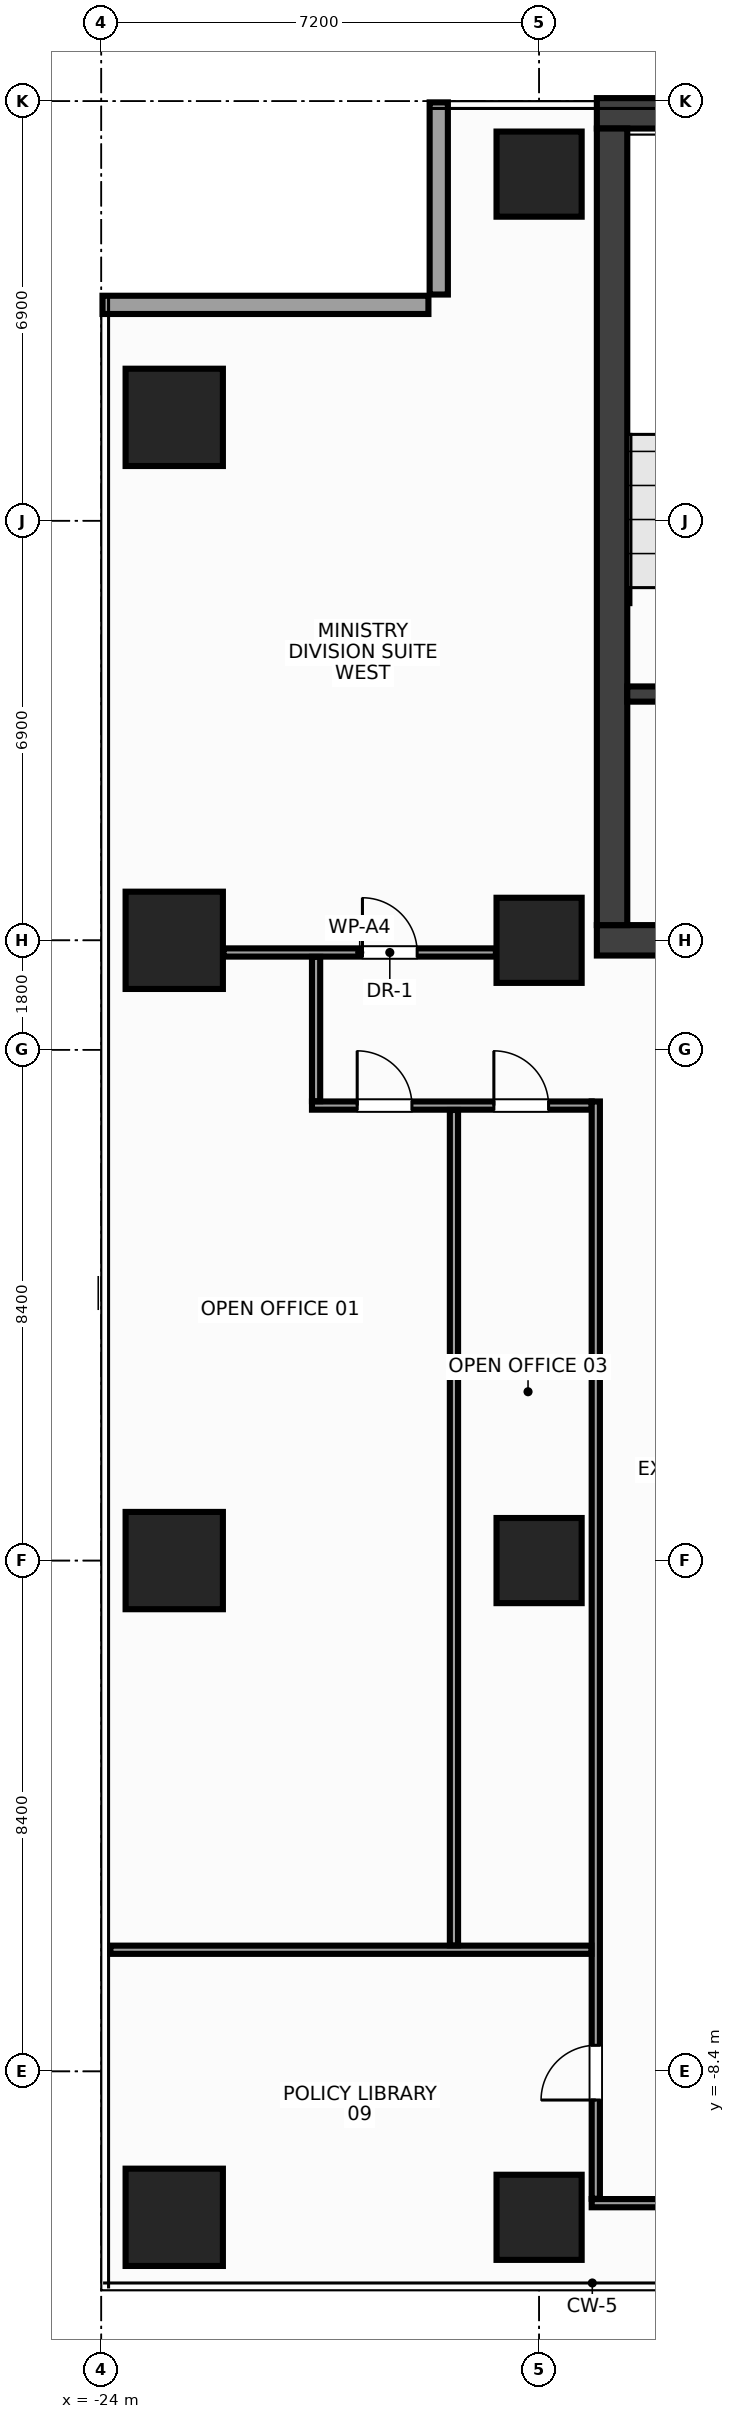
"""IFC4 building model, lengths in metres.
Left out: names, types, materials, properties, quantities, classifications, styles, units other than length and angle.
Written with IfcOpenShell. Run it as: python <this file> out.ifc"""

import sys

from ifc_helpers import new_model, si_unit, direction, frame, frame_2d, origin, origin_2d, place, context, subcontext, project, spatial, rectangle, extrude, source, transform, mapped, element, fill, save


model = new_model("IFC4")
c1 = context("Model", 3, precision=1e-05, world=origin(), true_north=direction((0.0, 1.0)))
c2 = subcontext(c1, "Body", "Model", "MODEL_VIEW")
j1 = project(units=[si_unit("LENGTHUNIT", "METRE"), si_unit("PLANEANGLEUNIT", "RADIAN")], contexts=[c1])
p1 = place(None, origin())
s1 = spatial("IfcSite", under=j1, at=p1, CompositionType="ELEMENT")
p2 = place(p1, origin())
s2 = spatial("IfcBuilding", under=s1, at=p2, CompositionType="ELEMENT")
p3 = place(p2, frame((0.0, 0.0, 196.4)))
s3 = spatial("IfcBuildingStorey", under=s2, at=p3, CompositionType="ELEMENT", Elevation=196.4)
m1 = source(origin(), c2, "Body", "SweptSolid", [
    extrude(rectangle(XDim=31.7, YDim=0.5, at=frame_2d((15.85, 0.0))), origin(), (0.0, 0.0, 1.0), 3.6),
])
p4 = place(p3, frame((-15.85, 23.8, 0.0), z_axis=(0.0, 0.0, 1.0), x_axis=(1.0, 0.0, 0.0)))
e1 = element("IfcWall", 1, at=p4, inside=s3, PredefinedType="SHEAR", context=c2, shape_type="MappedRepresentation", body=[
    mapped(m1, transform((0.0, 0.0, 0.0), x_axis=(1.0, 0.0, 0.0), y_axis=(0.0, 1.0, 0.0), z_axis=(0.0, 0.0, 1.0), scale=1.0)),
])
p5 = place(p3, frame((-15.85, 10.2, 0.0), z_axis=(0.0, 0.0, 1.0), x_axis=(1.0, 0.0, 0.0)))
e2 = element("IfcWall", 2, at=p5, inside=s3, PredefinedType="SHEAR", context=c2, shape_type="MappedRepresentation", body=[
    mapped(m1, transform((0.0, 0.0, 0.0), x_axis=(1.0, 0.0, 0.0), y_axis=(0.0, 1.0, 0.0), z_axis=(0.0, 0.0, 1.0), scale=1.0)),
])
p6 = place(p5, frame((1.7, 0.0, 0.0)))
e3 = element("IfcOpeningElement", 3, at=p6, cuts=e2, PredefinedType="OPENING", context=c2, shape_type="SweptSolid", body=[
    extrude(rectangle(XDim=1.6, YDim=2.15, at=frame_2d((0.8, 1.075))), frame((0.0, 0.262, 0.0), z_axis=(0.0, -1.0, 0.0), x_axis=(1.0, 0.0, 0.0)), (0.0, 0.0, 1.0), 0.524),
])
p7 = place(p5, frame((28.4, 0.0, 0.0)))
e4 = element("IfcOpeningElement", 4, at=p7, cuts=e2, PredefinedType="OPENING", context=c2, shape_type="SweptSolid", body=[
    extrude(rectangle(XDim=1.6, YDim=2.15, at=frame_2d((0.8, 1.075))), frame((0.0, 0.262, 0.0), z_axis=(0.0, -1.0, 0.0), x_axis=(1.0, 0.0, 0.0)), (0.0, 0.0, 1.0), 0.524),
])
p8 = place(p5, frame((15.1, 0.0, 0.0)))
e5 = element("IfcOpeningElement", 5, at=p8, cuts=e2, PredefinedType="OPENING", context=c2, shape_type="SweptSolid", body=[
    extrude(rectangle(XDim=1.5, YDim=2.2, at=frame_2d((0.75, 1.1))), frame((0.0, 0.262, 0.0), z_axis=(0.0, -1.0, 0.0), x_axis=(1.0, 0.0, 0.0)), (0.0, 0.0, 1.0), 0.524),
])
m2 = source(origin(), c2, "Body", "SweptSolid", [
    extrude(rectangle(XDim=13.1, YDim=0.5, at=frame_2d((6.55, 0.0))), origin(), (0.0, 0.0, 1.0), 3.6),
])
p9 = place(p3, frame((-15.6, 10.45, 0.0), z_axis=(0.0, 0.0, 1.0), x_axis=(0.0, 1.0, 0.0)))
e6 = element("IfcWall", 6, at=p9, inside=s3, PredefinedType="SHEAR", context=c2, shape_type="MappedRepresentation", body=[
    mapped(m2, transform((0.0, 0.0, 0.0), x_axis=(1.0, 0.0, 0.0), y_axis=(0.0, 1.0, 0.0), z_axis=(0.0, 0.0, 1.0), scale=1.0)),
])
m3 = source(origin(), c2, "Body", "SweptSolid", [
    extrude(rectangle(XDim=3.705, YDim=0.25, at=frame_2d((1.853, 0.0))), origin(), (0.0, 0.0, 1.0), 3.6),
])
p10 = place(p3, frame((-15.35, 14.25, 0.0), z_axis=(0.0, 0.0, 1.0), x_axis=(1.0, 0.0, 0.0)))
e7 = element("IfcWall", 7, at=p10, inside=s3, PredefinedType="SHEAR", context=c2, shape_type="MappedRepresentation", body=[
    mapped(m3, transform((0.0, 0.0, 0.0), x_axis=(1.0, 0.0, 0.0), y_axis=(0.0, 1.0, 0.0), z_axis=(0.0, 0.0, 1.0), scale=1.0)),
])
p11 = place(p10, frame((0.95, 0.0, 0.0)))
e8 = element("IfcOpeningElement", 8, at=p11, cuts=e7, PredefinedType="OPENING", context=c2, shape_type="SweptSolid", body=[
    extrude(rectangle(XDim=1.6, YDim=2.15, at=frame_2d((0.8, 1.075))), frame((0.0, 0.137, 0.0), z_axis=(0.0, -1.0, 0.0), x_axis=(1.0, 0.0, 0.0)), (0.0, 0.0, 1.0), 0.274),
])
m4 = source(origin(), c2, "Body", "SweptSolid", [
    extrude(rectangle(XDim=1.4, YDim=1.4, at=origin_2d()), origin(), (0.0, 0.0, 1.0), 3.6),
])
for number, where, z_axis, x_axis in (
    (9, (-16.8, -10.8, 0.0), (0.0, 0.0, 1.0), (1.0, 0.0, 0.0)),
    (10, (-16.8, 0.0, 0.0), (0.0, 0.0, 1.0), (1.0, 0.0, 0.0)),
    (11, (-16.8, 10.2, 0.0), (0.0, 0.0, 1.0), (1.0, 0.0, 0.0)),
    (12, (-16.8, 22.8, 0.0), (0.0, 0.0, 1.0), (1.0, 0.0, 0.0)),
):
    element("IfcColumn", number, at=place(p3, frame(where, z_axis=z_axis, x_axis=x_axis)), inside=s3, PredefinedType="COLUMN", context=c2, shape_type="MappedRepresentation", body=[
        mapped(m4, transform((0.0, 0.0, 0.0), x_axis=(1.0, 0.0, 0.0), y_axis=(0.0, 1.0, 0.0), z_axis=(0.0, 0.0, 1.0), scale=1.0)),
    ])
m5 = source(origin(), c2, "Body", "SweptSolid", [
    extrude(rectangle(XDim=1.6, YDim=1.6, at=origin_2d()), origin(), (0.0, 0.0, 1.0), 3.6),
])
for number, where, z_axis, x_axis in (
    (13, (-22.8, -10.8, 0.0), (0.0, 0.0, 1.0), (1.0, 0.0, 0.0)),
    (14, (-22.8, 0.0, 0.0), (0.0, 0.0, 1.0), (1.0, 0.0, 0.0)),
    (15, (-22.8, 10.2, 0.0), (0.0, 0.0, 1.0), (1.0, 0.0, 0.0)),
    (16, (-22.8, 18.8, 0.0), (0.0, 0.0, 1.0), (1.0, 0.0, 0.0)),
):
    element("IfcColumn", number, at=place(p3, frame(where, z_axis=z_axis, x_axis=x_axis)), inside=s3, PredefinedType="COLUMN", context=c2, shape_type="MappedRepresentation", body=[
        mapped(m5, transform((0.0, 0.0, 0.0), x_axis=(1.0, 0.0, 0.0), y_axis=(0.0, 1.0, 0.0), z_axis=(0.0, 0.0, 1.0), scale=1.0)),
    ])
m6 = source(origin(), c2, "Body", "SweptSolid", [
    extrude(rectangle(XDim=3.16, YDim=0.3, at=frame_2d((1.58, 0.0))), origin(), (0.0, 0.0, 1.0), 2.76),
])
p12 = place(p3, frame((-18.45, 23.98, 0.0), z_axis=(0.0, 0.0, 1.0), x_axis=(0.0, -1.0, 0.0)))
e17 = element("IfcWall", 17, at=p12, inside=s3, PredefinedType="STANDARD", context=c2, shape_type="MappedRepresentation", body=[
    mapped(m6, transform((0.0, 0.0, 0.0), x_axis=(1.0, 0.0, 0.0), y_axis=(0.0, 1.0, 0.0), z_axis=(0.0, 0.0, 1.0), scale=1.0)),
])
m7 = source(origin(), c2, "Body", "SweptSolid", [
    extrude(rectangle(XDim=5.36, YDim=0.3, at=frame_2d((2.68, 0.0))), origin(), (0.0, 0.0, 1.0), 2.76),
])
p13 = place(p3, frame((-18.62, 20.65, 0.0), z_axis=(0.0, 0.0, 1.0), x_axis=(-1.0, 0.0, 0.0)))
e18 = element("IfcWall", 18, at=p13, inside=s3, PredefinedType="STANDARD", context=c2, shape_type="MappedRepresentation", body=[
    mapped(m7, transform((0.0, 0.0, 0.0), x_axis=(1.0, 0.0, 0.0), y_axis=(0.0, 1.0, 0.0), z_axis=(0.0, 0.0, 1.0), scale=1.0)),
])
m8 = source(origin(), c2, "Body", "SweptSolid", [
    extrude(rectangle(XDim=4.48, YDim=0.135, at=frame_2d((2.24, 0.0))), origin(), (0.0, 0.0, 1.0), 2.915),
])
p14 = place(p3, frame((-21.99, 10.0, 0.0), z_axis=(0.0, 0.0, 1.0), x_axis=(1.0, 0.0, 0.0)))
e19 = element("IfcWall", 19, at=p14, inside=s3, PredefinedType="PARTITIONING", context=c2, shape_type="MappedRepresentation", body=[
    mapped(m8, transform((0.0, 0.0, 0.0), x_axis=(1.0, 0.0, 0.0), y_axis=(0.0, 1.0, 0.0), z_axis=(0.0, 0.0, 1.0), scale=1.0)),
])
p15 = place(p14, frame((2.285, 0.0, 0.0)))
e20 = element("IfcOpeningElement", 20, at=p15, cuts=e19, PredefinedType="OPENING", context=c2, shape_type="SweptSolid", body=[
    extrude(rectangle(XDim=0.9, YDim=2.15, at=frame_2d((0.45, 1.075))), frame((0.0, 0.08, 0.0), z_axis=(0.0, -1.0, 0.0), x_axis=(1.0, 0.0, 0.0)), (0.0, 0.0, 1.0), 0.159),
])
m9 = source(origin(), c2, "Body", "SweptSolid", [
    extrude(rectangle(XDim=4.6, YDim=0.135, at=frame_2d((2.3, 0.0))), origin(), (0.0, 0.0, 1.0), 2.765),
])
p16 = place(p3, frame((-20.535, 7.482, 0.0), z_axis=(0.0, 0.0, 1.0), x_axis=(1.0, 0.0, 0.0)))
e21 = element("IfcWall", 21, at=p16, inside=s3, PredefinedType="PARTITIONING", context=c2, shape_type="MappedRepresentation", body=[
    mapped(m9, transform((0.0, 0.0, 0.0), x_axis=(1.0, 0.0, 0.0), y_axis=(0.0, 1.0, 0.0), z_axis=(0.0, 0.0, 1.0), scale=1.0)),
])
p17 = place(p16, frame((0.744, 0.0, 0.0)))
e22 = element("IfcOpeningElement", 22, at=p17, cuts=e21, PredefinedType="OPENING", context=c2, shape_type="SweptSolid", body=[
    extrude(rectangle(XDim=0.9, YDim=2.15, at=frame_2d((0.45, 1.075))), frame((0.0, 0.08, 0.0), z_axis=(0.0, -1.0, 0.0), x_axis=(1.0, 0.0, 0.0)), (0.0, 0.0, 1.0), 0.159),
])
p18 = place(p16, frame((2.991, 0.0, 0.0)))
e23 = element("IfcOpeningElement", 23, at=p18, cuts=e21, PredefinedType="OPENING", context=c2, shape_type="SweptSolid", body=[
    extrude(rectangle(XDim=0.9, YDim=2.15, at=frame_2d((0.45, 1.075))), frame((0.0, 0.08, 0.0), z_axis=(0.0, -1.0, 0.0), x_axis=(1.0, 0.0, 0.0)), (0.0, 0.0, 1.0), 0.159),
])
m10 = source(origin(), c2, "Body", "SweptSolid", [
    extrude(rectangle(XDim=2.37, YDim=0.135, at=frame_2d((1.185, 0.0))), origin(), (0.0, 0.0, 1.0), 3.38),
])
p19 = place(p3, frame((-15.935, -10.567, 0.0), z_axis=(0.0, 0.0, 1.0), x_axis=(1.0, 0.0, 0.0)))
e24 = element("IfcWall", 24, at=p19, inside=s3, PredefinedType="PARTITIONING", context=c2, shape_type="MappedRepresentation", body=[
    mapped(m10, transform((0.0, 0.0, 0.0), x_axis=(1.0, 0.0, 0.0), y_axis=(0.0, 1.0, 0.0), z_axis=(0.0, 0.0, 1.0), scale=1.0)),
])
m11 = source(origin(), c2, "Body", "SweptSolid", [
    extrude(rectangle(XDim=2.373, YDim=0.135, at=frame_2d((1.186, 0.0))), origin(), (0.0, 0.0, 1.0), 3.38),
])
p20 = place(p3, frame((-20.468, 7.555, 0.0), z_axis=(0.0, 0.0, 1.0), x_axis=(0.0, 1.0, 0.0)))
e25 = element("IfcWall", 25, at=p20, inside=s3, PredefinedType="PARTITIONING", context=c2, shape_type="MappedRepresentation", body=[
    mapped(m11, transform((0.0, 0.0, 0.0), x_axis=(1.0, 0.0, 0.0), y_axis=(0.0, 1.0, 0.0), z_axis=(0.0, 0.0, 1.0), scale=1.0)),
])
m12 = source(origin(), c2, "Body", "SweptSolid", [
    extrude(rectangle(XDim=18.045, YDim=0.135, at=frame_2d((9.022, 0.0))), origin(), (0.0, 0.0, 1.0), 2.915),
])
p21 = place(p3, frame((-15.867, -10.495, 0.0), z_axis=(0.0, 0.0, 1.0), x_axis=(0.0, 1.0, 0.0)))
e26 = element("IfcWall", 26, at=p21, inside=s3, PredefinedType="PARTITIONING", context=c2, shape_type="MappedRepresentation", body=[
    mapped(m12, transform((0.0, 0.0, 0.0), x_axis=(1.0, 0.0, 0.0), y_axis=(0.0, 1.0, 0.0), z_axis=(0.0, 0.0, 1.0), scale=1.0)),
])
p22 = place(p21, frame((1.624, 0.0, 0.0)))
e27 = element("IfcOpeningElement", 27, at=p22, cuts=e26, PredefinedType="OPENING", context=c2, shape_type="SweptSolid", body=[
    extrude(rectangle(XDim=0.9, YDim=2.15, at=frame_2d((0.45, 1.075))), frame((0.0, 0.08, 0.0), z_axis=(0.0, -1.0, 0.0), x_axis=(1.0, 0.0, 0.0)), (0.0, 0.0, 1.0), 0.159),
])
m13 = source(origin(), c2, "Body", "SweptSolid", [
    extrude(rectangle(XDim=7.91, YDim=0.135, at=frame_2d((3.955, 0.0))), origin(), (0.0, 0.0, 1.0), 2.765),
])
p23 = place(p3, frame((-23.85, -6.4, 0.0), z_axis=(0.0, 0.0, 1.0), x_axis=(1.0, 0.0, 0.0)))
e28 = element("IfcWall", 28, at=p23, inside=s3, PredefinedType="PARTITIONING", context=c2, shape_type="MappedRepresentation", body=[
    mapped(m13, transform((0.0, 0.0, 0.0), x_axis=(1.0, 0.0, 0.0), y_axis=(0.0, 1.0, 0.0), z_axis=(0.0, 0.0, 1.0), scale=1.0)),
])
m14 = source(origin(), c2, "Body", "SweptSolid", [
    extrude(rectangle(XDim=13.737, YDim=0.135, at=frame_2d((6.869, 0.0))), origin(), (0.0, 0.0, 1.0), 2.915),
])
p24 = place(p3, frame((-18.2, -6.327, 0.0), z_axis=(0.0, 0.0, 1.0), x_axis=(0.0, 1.0, 0.0)))
e29 = element("IfcWall", 29, at=p24, inside=s3, PredefinedType="PARTITIONING", context=c2, shape_type="MappedRepresentation", body=[
    mapped(m14, transform((0.0, 0.0, 0.0), x_axis=(1.0, 0.0, 0.0), y_axis=(0.0, 1.0, 0.0), z_axis=(0.0, 0.0, 1.0), scale=1.0)),
])
m15 = source(origin(), c2, "Body", "SweptSolid", [
    extrude(rectangle(XDim=0.9, YDim=2.15, at=frame_2d((0.45, 1.075))), frame((0.0, 0.025, 0.0), z_axis=(0.0, -1.0, 0.0), x_axis=(1.0, 0.0, 0.0)), (0.0, 0.0, 1.0), 0.05),
])
p25 = place(p15, origin())
e30 = element("IfcDoor", 30, at=p25, inside=s3, OperationType="SINGLE_SWING_LEFT", PredefinedType="DOOR", context=c2, shape_type="MappedRepresentation", body=[
    mapped(m15, transform((0.0, 0.0, 0.0), x_axis=(1.0, 0.0, 0.0), y_axis=(0.0, 1.0, 0.0), z_axis=(0.0, 0.0, 1.0), scale=1.0)),
])
fill(e20, e30)
p26 = place(p17, origin())
e31 = element("IfcDoor", 31, at=p26, inside=s3, OperationType="SINGLE_SWING_LEFT", PredefinedType="DOOR", context=c2, shape_type="MappedRepresentation", body=[
    mapped(m15, transform((0.0, 0.0, 0.0), x_axis=(1.0, 0.0, 0.0), y_axis=(0.0, 1.0, 0.0), z_axis=(0.0, 0.0, 1.0), scale=1.0)),
])
fill(e22, e31)
p27 = place(p18, origin())
e32 = element("IfcDoor", 32, at=p27, inside=s3, OperationType="SINGLE_SWING_LEFT", PredefinedType="DOOR", context=c2, shape_type="MappedRepresentation", body=[
    mapped(m15, transform((0.0, 0.0, 0.0), x_axis=(1.0, 0.0, 0.0), y_axis=(0.0, 1.0, 0.0), z_axis=(0.0, 0.0, 1.0), scale=1.0)),
])
fill(e23, e32)
p28 = place(p22, origin())
e33 = element("IfcDoor", 33, at=p28, inside=s3, OperationType="SINGLE_SWING_LEFT", PredefinedType="DOOR", context=c2, shape_type="MappedRepresentation", body=[
    mapped(m15, transform((0.0, 0.0, 0.0), x_axis=(1.0, 0.0, 0.0), y_axis=(0.0, 1.0, 0.0), z_axis=(0.0, 0.0, 1.0), scale=1.0)),
])
fill(e27, e33)
save(model, sys.argv[1])
